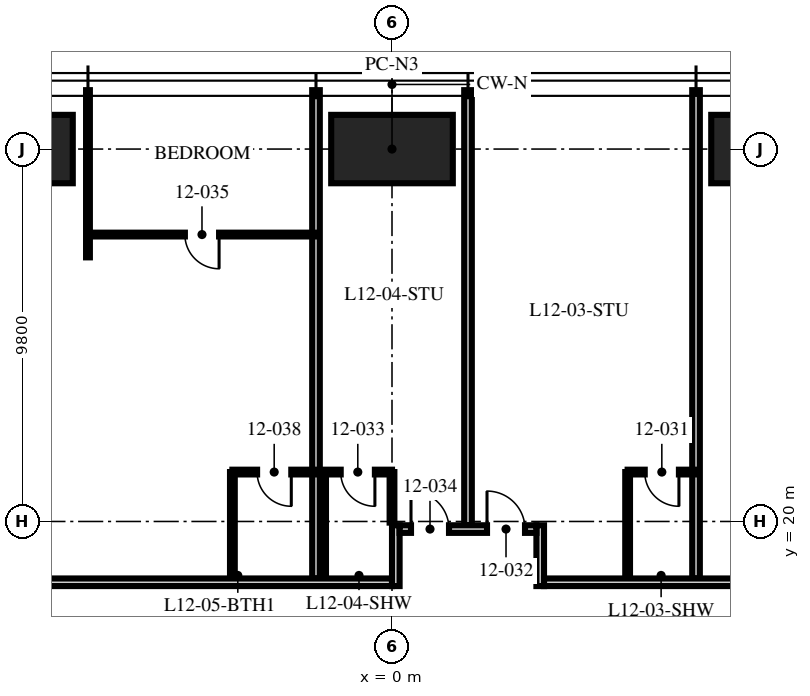
"""IFC4 building model, lengths in metres.
Left out: names, types, materials, properties, quantities, classifications, styles, units other than length and angle.
Written with IfcOpenShell. Run it as: python <this file> out.ifc"""

import sys

from ifc_helpers import new_model, si_unit, direction, frame, frame_2d, origin, origin_2d, place, context, subcontext, project, spatial, rectangle, hollow_rectangle, extrude, element, fill, save


model = new_model("IFC4")
c1 = context("Model", 3, precision=1e-05, world=origin(), true_north=direction((0.0, 1.0)))
c2 = subcontext(c1, "Body", "Model", "MODEL_VIEW")
j1 = project(units=[si_unit("LENGTHUNIT", "METRE"), si_unit("PLANEANGLEUNIT", "RADIAN")], contexts=[c1])
p1 = place(None, origin())
s1 = spatial("IfcSite", under=j1, at=p1, CompositionType="ELEMENT")
p2 = place(p1, origin())
s2 = spatial("IfcBuilding", under=s1, at=p2, CompositionType="ELEMENT")
p3 = place(p2, frame((0.0, 0.0, 51.0)))
s3 = spatial("IfcBuildingStorey", under=s2, at=p3, CompositionType="ELEMENT", Elevation=51.0)
for number, where, z_axis, x_axis in (
    (1, (-10.0, 29.8, 0.0), (0.0, 0.0, 1.0), (1.0, 0.0, 0.0)),
    (2, (0.0, 29.8, 0.0), (0.0, 0.0, 1.0), (1.0, 0.0, 0.0)),
    (3, (10.0, 29.8, 0.0), (0.0, 0.0, 1.0), (1.0, 0.0, 0.0)),
):
    element("IfcColumn", number, at=place(p3, frame(where, z_axis=z_axis, x_axis=x_axis)), inside=s3, PredefinedType="COLUMN", context=c2, shape_type="SweptSolid", body=[
        extrude(hollow_rectangle(XDim=3.2, YDim=1.8, WallThickness=0.2, at=origin_2d()), origin(), (0.0, 0.0, 1.0), 3.75),
    ])
p4 = place(p3, frame((8.0, 18.5, 0.0), z_axis=(0.0, 0.0, 1.0), x_axis=(0.0, 1.0, 0.0)))
e4 = element("IfcWall", 4, at=p4, inside=s3, PredefinedType="PARTITIONING", context=c2, shape_type="SweptSolid", body=[
    extrude(rectangle(XDim=12.85, YDim=0.2, at=frame_2d((6.425, 0.0))), origin(), (0.0, 0.0, 1.0), 2.71),
])
p5 = place(p3, frame((2.0, 19.9, 0.0), z_axis=(0.0, 0.0, 1.0), x_axis=(0.0, 1.0, 0.0)))
e5 = element("IfcWall", 5, at=p5, inside=s3, PredefinedType="PARTITIONING", context=c2, shape_type="SweptSolid", body=[
    extrude(rectangle(XDim=11.45, YDim=0.2, at=frame_2d((5.725, 0.0))), origin(), (0.0, 0.0, 1.0), 2.71),
])
p6 = place(p3, frame((-2.0, 18.5, 0.0), z_axis=(0.0, 0.0, 1.0), x_axis=(0.0, 1.0, 0.0)))
e6 = element("IfcWall", 6, at=p6, inside=s3, PredefinedType="PARTITIONING", context=c2, shape_type="SweptSolid", body=[
    extrude(rectangle(XDim=12.85, YDim=0.2, at=frame_2d((6.425, 0.0))), origin(), (0.0, 0.0, 1.0), 2.71),
])
p7 = place(p3, frame((-8.0, 26.95, 0.0), z_axis=(0.0, 0.0, 1.0), x_axis=(0.0, 1.0, 0.0)))
e7 = element("IfcWall", 7, at=p7, inside=s3, PredefinedType="PARTITIONING", context=c2, shape_type="SweptSolid", body=[
    extrude(rectangle(XDim=4.4, YDim=0.1, at=frame_2d((2.2, 0.0))), origin(), (0.0, 0.0, 1.0), 2.71),
])
p8 = place(p3, frame((8.0, 21.3, 0.0), z_axis=(0.0, 0.0, 1.0), x_axis=(-1.0, 0.0, 0.0)))
e8 = element("IfcWall", 8, at=p8, inside=s3, PredefinedType="PARTITIONING", context=c2, shape_type="SweptSolid", body=[
    extrude(rectangle(XDim=1.8, YDim=0.125, at=frame_2d((0.9, 0.0))), origin(), (0.0, 0.0, 1.0), 3.5),
])
p9 = place(p8, frame((0.45, 0.0, 0.0)))
e9 = element("IfcOpeningElement", 9, at=p9, cuts=e8, PredefinedType="OPENING", context=c2, shape_type="SweptSolid", body=[
    extrude(rectangle(XDim=0.9, YDim=2.1, at=frame_2d((0.45, 1.05))), frame((0.0, 0.073, 0.0), z_axis=(0.0, -1.0, 0.0), x_axis=(1.0, 0.0, 0.0)), (0.0, 0.0, 1.0), 0.145),
])
p10 = place(p3, frame((6.2, 18.5, 0.0), z_axis=(0.0, 0.0, 1.0), x_axis=(0.0, 1.0, 0.0)))
e10 = element("IfcWall", 10, at=p10, inside=s3, PredefinedType="PARTITIONING", context=c2, shape_type="SweptSolid", body=[
    extrude(rectangle(XDim=2.8, YDim=0.125, at=frame_2d((1.4, 0.0))), origin(), (0.0, 0.0, 1.0), 3.5),
])
p11 = place(p3, frame((0.0, 21.3, 0.0), z_axis=(0.0, 0.0, 1.0), x_axis=(-1.0, 0.0, 0.0)))
e11 = element("IfcWall", 11, at=p11, inside=s3, PredefinedType="PARTITIONING", context=c2, shape_type="SweptSolid", body=[
    extrude(rectangle(XDim=1.8, YDim=0.125, at=frame_2d((0.9, 0.0))), origin(), (0.0, 0.0, 1.0), 2.492),
])
p12 = place(p11, frame((0.45, 0.0, 0.0)))
e12 = element("IfcOpeningElement", 12, at=p12, cuts=e11, PredefinedType="OPENING", context=c2, shape_type="SweptSolid", body=[
    extrude(rectangle(XDim=0.9, YDim=2.1, at=frame_2d((0.45, 1.05))), frame((0.0, 0.073, 0.0), z_axis=(0.0, -1.0, 0.0), x_axis=(1.0, 0.0, 0.0)), (0.0, 0.0, 1.0), 0.145),
])
p13 = place(p3, frame((0.0, 19.97, 0.0), z_axis=(0.0, 0.0, 1.0), x_axis=(0.0, 1.0, 0.0)))
e13 = element("IfcWall", 13, at=p13, inside=s3, PredefinedType="PARTITIONING", context=c2, shape_type="SweptSolid", body=[
    extrude(rectangle(XDim=1.33, YDim=0.125, at=frame_2d((0.665, 0.0))), origin(), (0.0, 0.0, 1.0), 2.492),
])
p14 = place(p3, frame((-1.8, 18.5, 0.0), z_axis=(0.0, 0.0, 1.0), x_axis=(0.0, 1.0, 0.0)))
e14 = element("IfcWall", 14, at=p14, inside=s3, PredefinedType="PARTITIONING", context=c2, shape_type="SweptSolid", body=[
    extrude(rectangle(XDim=2.8, YDim=0.125, at=frame_2d((1.4, 0.0))), origin(), (0.0, 0.0, 1.0), 3.5),
])
p15 = place(p3, frame((-2.0, 27.55, 0.0), z_axis=(0.0, 0.0, 1.0), x_axis=(-1.0, 0.0, 0.0)))
e15 = element("IfcWall", 15, at=p15, inside=s3, PredefinedType="PARTITIONING", context=c2, shape_type="SweptSolid", body=[
    extrude(rectangle(XDim=6.0, YDim=0.1, at=frame_2d((3.0, 0.0))), origin(), (0.0, 0.0, 1.0), 2.61),
])
p16 = place(p15, frame((2.55, 0.0, 0.0)))
e16 = element("IfcOpeningElement", 16, at=p16, cuts=e15, PredefinedType="OPENING", context=c2, shape_type="SweptSolid", body=[
    extrude(rectangle(XDim=0.9, YDim=2.1, at=frame_2d((0.45, 1.05))), frame((0.0, 0.06, 0.0), z_axis=(0.0, -1.0, 0.0), x_axis=(1.0, 0.0, 0.0)), (0.0, 0.0, 1.0), 0.12),
])
p17 = place(p3, frame((-2.0, 21.3, 0.0), z_axis=(0.0, 0.0, 1.0), x_axis=(-1.0, 0.0, 0.0)))
e17 = element("IfcWall", 17, at=p17, inside=s3, PredefinedType="PARTITIONING", context=c2, shape_type="SweptSolid", body=[
    extrude(rectangle(XDim=2.2, YDim=0.125, at=frame_2d((1.1, 0.0))), origin(), (0.0, 0.0, 1.0), 3.5),
])
p18 = place(p17, frame((0.65, 0.0, 0.0)))
e18 = element("IfcOpeningElement", 18, at=p18, cuts=e17, PredefinedType="OPENING", context=c2, shape_type="SweptSolid", body=[
    extrude(rectangle(XDim=0.9, YDim=2.1, at=frame_2d((0.45, 1.05))), frame((0.0, 0.073, 0.0), z_axis=(0.0, -1.0, 0.0), x_axis=(1.0, 0.0, 0.0)), (0.0, 0.0, 1.0), 0.145),
])
p19 = place(p3, frame((-4.2, 18.5, 0.0), z_axis=(0.0, 0.0, 1.0), x_axis=(0.0, 1.0, 0.0)))
e19 = element("IfcWall", 19, at=p19, inside=s3, PredefinedType="PARTITIONING", context=c2, shape_type="SweptSolid", body=[
    extrude(rectangle(XDim=2.8, YDim=0.125, at=frame_2d((1.4, 0.0))), origin(), (0.0, 0.0, 1.0), 3.5),
])
p20 = place(p3, frame((-18.5, 18.4, 0.0), z_axis=(0.0, 0.0, 1.0), x_axis=(1.0, 0.0, 0.0)))
e20 = element("IfcWall", 20, at=p20, inside=s3, PredefinedType="PARTITIONING", context=c2, shape_type="SweptSolid", body=[
    extrude(rectangle(XDim=18.5, YDim=0.2, at=frame_2d((9.25, 0.0))), origin(), (0.0, 0.0, 1.0), 2.3),
])
p21 = place(p3, frame((0.1, 18.3, 0.0), z_axis=(0.0, 0.0, 1.0), x_axis=(0.0, 1.0, 0.0)))
e21 = element("IfcWall", 21, at=p21, inside=s3, PredefinedType="PARTITIONING", context=c2, shape_type="SweptSolid", body=[
    extrude(rectangle(XDim=1.6, YDim=0.2, at=frame_2d((0.8, 0.0))), origin(), (0.0, 0.0, 1.0), 2.492),
])
p22 = place(p3, frame((3.9, 18.3, 0.0), z_axis=(0.0, 0.0, 1.0), x_axis=(0.0, 1.0, 0.0)))
e22 = element("IfcWall", 22, at=p22, inside=s3, PredefinedType="PARTITIONING", context=c2, shape_type="SweptSolid", body=[
    extrude(rectangle(XDim=1.6, YDim=0.2, at=frame_2d((0.8, 0.0))), origin(), (0.0, 0.0, 1.0), 3.5),
])
p23 = place(p3, frame((0.2, 19.8, 0.0), z_axis=(0.0, 0.0, 1.0), x_axis=(1.0, 0.0, 0.0)))
e23 = element("IfcWall", 23, at=p23, inside=s3, PredefinedType="PARTITIONING", context=c2, shape_type="SweptSolid", body=[
    extrude(rectangle(XDim=3.6, YDim=0.2, at=frame_2d((1.8, 0.0))), origin(), (0.0, 0.0, 1.0), 3.5),
])
p24 = place(p23, frame((2.3, 0.0, 0.0)))
e24 = element("IfcOpeningElement", 24, at=p24, cuts=e23, PredefinedType="OPENING", context=c2, shape_type="SweptSolid", body=[
    extrude(rectangle(XDim=1.0, YDim=2.2, at=frame_2d((0.5, 1.1))), frame((0.0, 0.11, 0.0), z_axis=(0.0, -1.0, 0.0), x_axis=(1.0, 0.0, 0.0)), (0.0, 0.0, 1.0), 0.22),
])
p25 = place(p23, frame((0.3, 0.0, 0.0)))
e25 = element("IfcOpeningElement", 25, at=p25, cuts=e23, PredefinedType="OPENING", context=c2, shape_type="SweptSolid", body=[
    extrude(rectangle(XDim=1.0, YDim=2.2, at=frame_2d((0.5, 1.1))), frame((0.0, 0.11, 0.0), z_axis=(0.0, -1.0, 0.0), x_axis=(1.0, 0.0, 0.0)), (0.0, 0.0, 1.0), 0.22),
])
p26 = place(p3, frame((4.0, 18.4, 0.0), z_axis=(0.0, 0.0, 1.0), x_axis=(1.0, 0.0, 0.0)))
e26 = element("IfcWall", 26, at=p26, inside=s3, PredefinedType="PARTITIONING", context=c2, shape_type="SweptSolid", body=[
    extrude(rectangle(XDim=14.5, YDim=0.2, at=frame_2d((7.25, 0.0))), origin(), (0.0, 0.0, 1.0), 2.3),
])
p27 = place(p9, origin())
e27 = element("IfcDoor", 27, at=p27, inside=s3, OperationType="SINGLE_SWING_LEFT", PredefinedType="DOOR", context=c2, shape_type="SweptSolid", body=[
    extrude(rectangle(XDim=0.9, YDim=2.1, at=frame_2d((0.45, 1.05))), frame((0.0, 0.025, 0.0), z_axis=(0.0, -1.0, 0.0), x_axis=(1.0, 0.0, 0.0)), (0.0, 0.0, 1.0), 0.05),
])
fill(e9, e27)
p28 = place(p24, origin())
e28 = element("IfcDoor", 28, at=p28, inside=s3, OperationType="SINGLE_SWING_LEFT", PredefinedType="DOOR", context=c2, shape_type="SweptSolid", body=[
    extrude(rectangle(XDim=1.0, YDim=2.2, at=frame_2d((0.5, 1.1))), frame((0.0, 0.025, 0.0), z_axis=(0.0, -1.0, 0.0), x_axis=(1.0, 0.0, 0.0)), (0.0, 0.0, 1.0), 0.05),
])
fill(e24, e28)
p29 = place(p12, origin())
e29 = element("IfcDoor", 29, at=p29, inside=s3, OperationType="SINGLE_SWING_LEFT", PredefinedType="DOOR", context=c2, shape_type="SweptSolid", body=[
    extrude(rectangle(XDim=0.9, YDim=2.1, at=frame_2d((0.45, 1.05))), frame((0.0, 0.025, 0.0), z_axis=(0.0, -1.0, 0.0), x_axis=(1.0, 0.0, 0.0)), (0.0, 0.0, 1.0), 0.05),
])
fill(e12, e29)
p30 = place(p25, origin())
e30 = element("IfcDoor", 30, at=p30, inside=s3, OperationType="SINGLE_SWING_LEFT", PredefinedType="DOOR", context=c2, shape_type="SweptSolid", body=[
    extrude(rectangle(XDim=1.0, YDim=2.2, at=frame_2d((0.5, 1.1))), frame((0.0, 0.025, 0.0), z_axis=(0.0, -1.0, 0.0), x_axis=(1.0, 0.0, 0.0)), (0.0, 0.0, 1.0), 0.05),
])
fill(e25, e30)
p31 = place(p16, origin())
e31 = element("IfcDoor", 31, at=p31, inside=s3, OperationType="SINGLE_SWING_LEFT", PredefinedType="DOOR", context=c2, shape_type="SweptSolid", body=[
    extrude(rectangle(XDim=0.9, YDim=2.1, at=frame_2d((0.45, 1.05))), frame((0.0, 0.025, 0.0), z_axis=(0.0, -1.0, 0.0), x_axis=(1.0, 0.0, 0.0)), (0.0, 0.0, 1.0), 0.05),
])
fill(e16, e31)
p32 = place(p18, origin())
e32 = element("IfcDoor", 32, at=p32, inside=s3, OperationType="SINGLE_SWING_LEFT", PredefinedType="DOOR", context=c2, shape_type="SweptSolid", body=[
    extrude(rectangle(XDim=0.9, YDim=2.1, at=frame_2d((0.45, 1.05))), frame((0.0, 0.025, 0.0), z_axis=(0.0, -1.0, 0.0), x_axis=(1.0, 0.0, 0.0)), (0.0, 0.0, 1.0), 0.05),
])
fill(e18, e32)
save(model, sys.argv[1])
